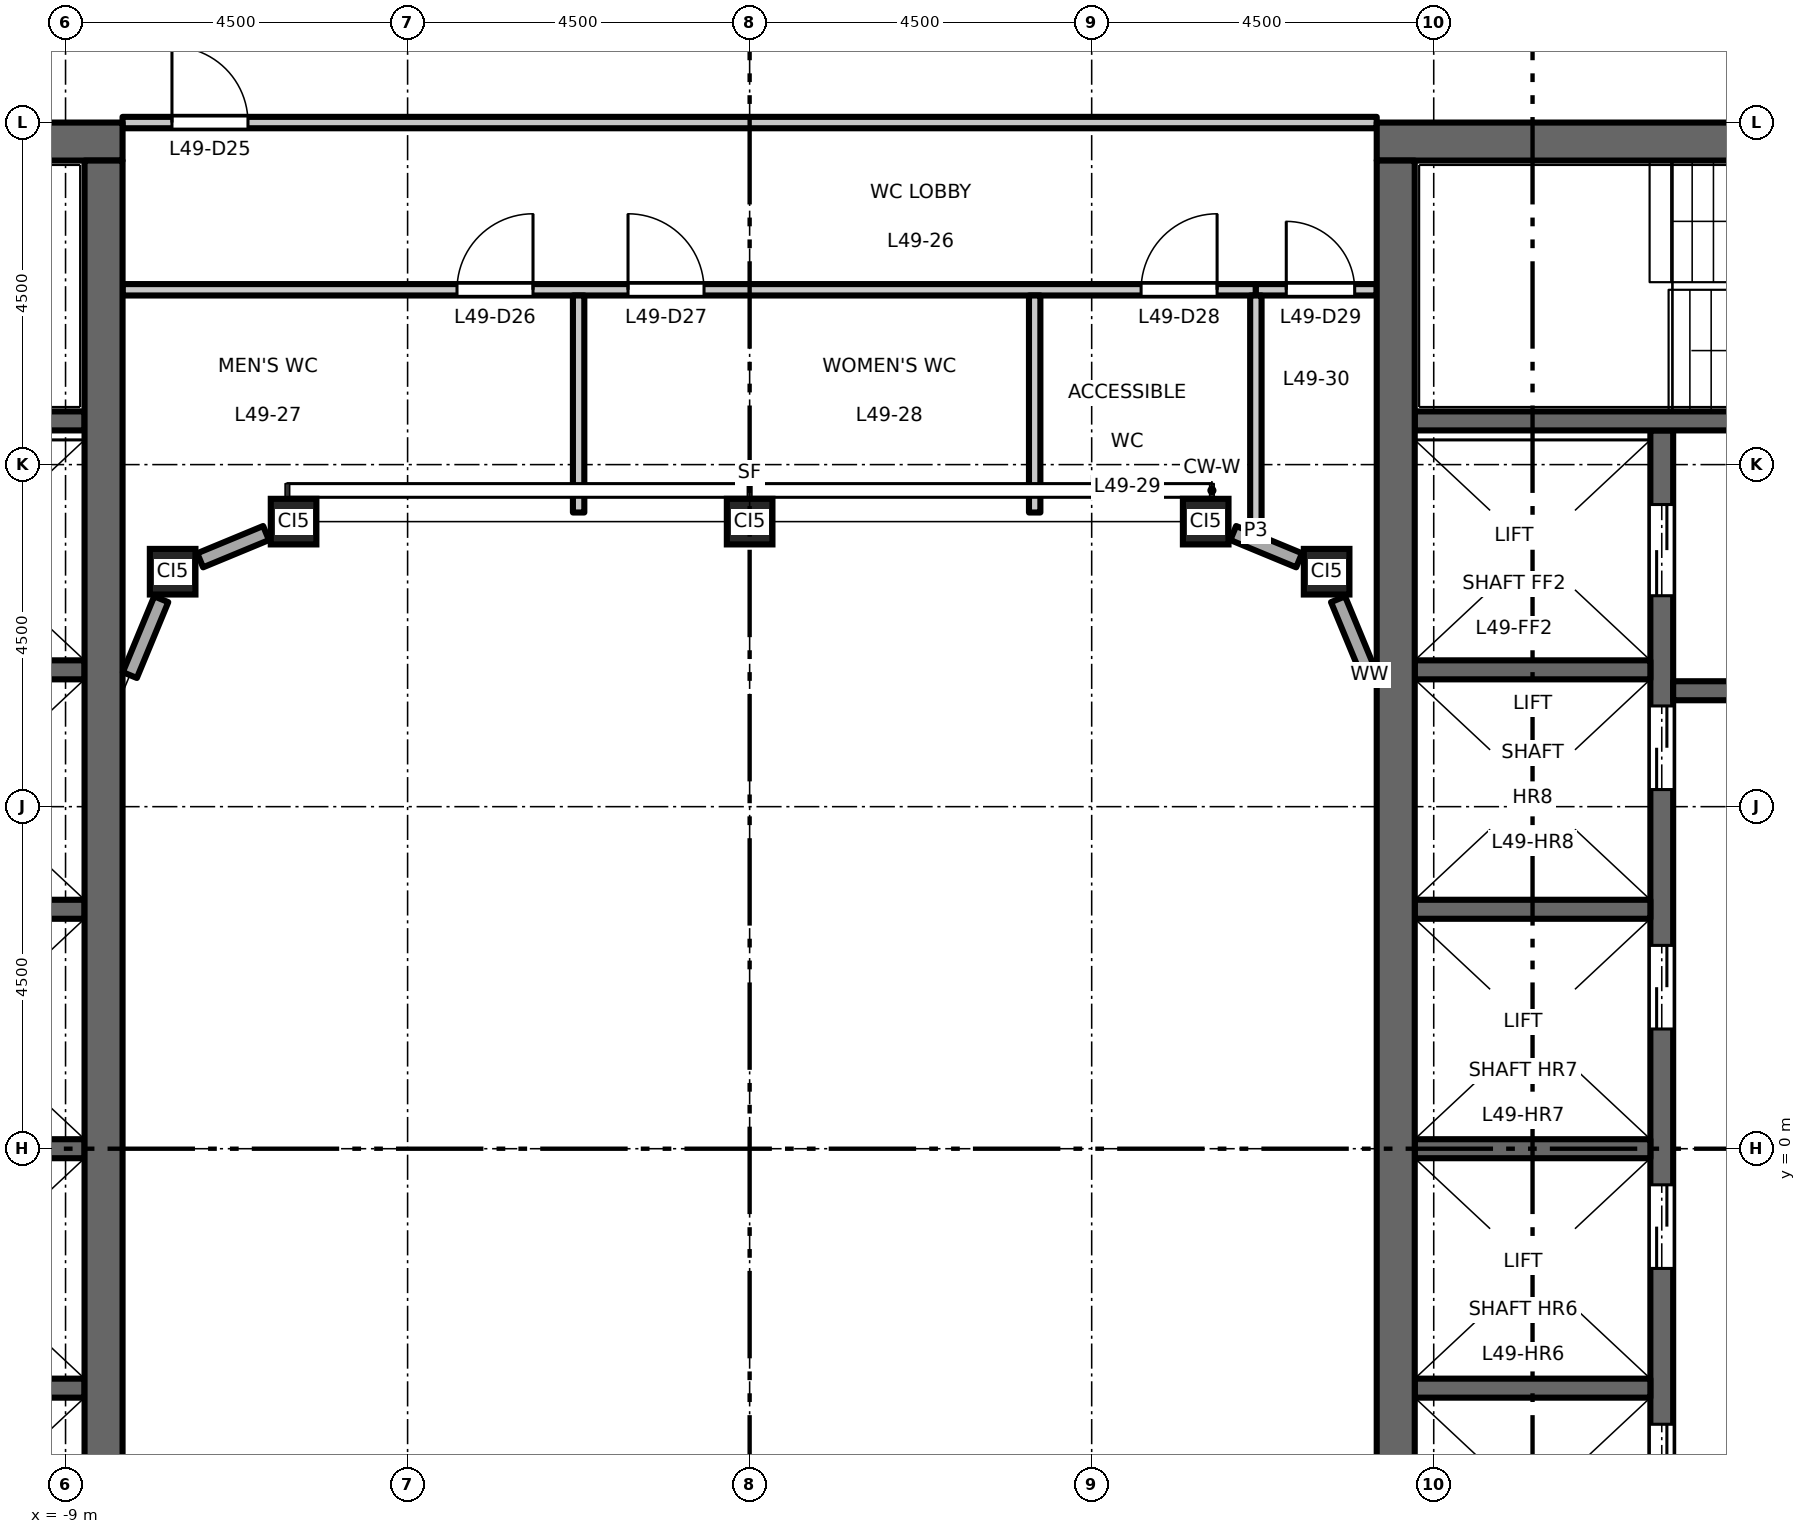
"""IFC4 building model, lengths in metres.
Left out: names, types, materials, properties, quantities, classifications, styles, units other than length and angle.
Written with IfcOpenShell. Run it as: python <this file> out.ifc"""

import sys

from ifc_helpers import new_model, si_unit, direction, frame, frame_2d, origin, origin_2d, place, context, subcontext, project, spatial, rectangle, hollow_rectangle, extrude, element, fill, save


model = new_model("IFC4")
c1 = context("Model", 3, precision=1e-05, world=origin(), true_north=direction((0.0, 1.0)))
c2 = subcontext(c1, "Body", "Model", "MODEL_VIEW")
j1 = project(units=[si_unit("LENGTHUNIT", "METRE"), si_unit("PLANEANGLEUNIT", "RADIAN")], contexts=[c1])
p1 = place(None, origin())
s1 = spatial("IfcSite", under=j1, at=p1, CompositionType="ELEMENT")
p2 = place(p1, origin())
s2 = spatial("IfcBuilding", under=s1, at=p2, CompositionType="ELEMENT")
p3 = place(p2, frame((0.0, 0.0, 228.7)))
s3 = spatial("IfcBuildingStorey", under=s2, at=p3, CompositionType="ELEMENT", Elevation=228.7)
for number, where, z_axis, x_axis in (
    (1, (-7.591, 7.591, 0.0), (0.0, 0.0, 1.0), (1.0, 0.0, 0.0)),
    (2, (-6.0, 8.25, 0.0), (0.0, 0.0, 1.0), (1.0, 0.0, 0.0)),
    (3, (0.0, 8.25, 0.0), (0.0, 0.0, 1.0), (1.0, 0.0, 0.0)),
    (4, (6.0, 8.25, 0.0), (0.0, 0.0, 1.0), (1.0, 0.0, 0.0)),
    (5, (7.591, 7.591, 0.0), (0.0, 0.0, 1.0), (1.0, 0.0, 0.0)),
):
    element("IfcColumn", number, at=place(p3, frame(where, z_axis=z_axis, x_axis=x_axis)), inside=s3, PredefinedType="COLUMN", context=c2, shape_type="SweptSolid", body=[
        extrude(hollow_rectangle(XDim=0.6, YDim=0.6, WallThickness=0.032, at=origin_2d()), origin(), (0.0, 0.0, 1.0), 4.5),
    ])
for number, where, z_axis, x_axis in (
    (6, (-8.75, 0.0, 0.0), (0.0, 0.0, 1.0), (-1.0, 0.0, 0.0)),
    (7, (-8.75, 3.15, 0.0), (0.0, 0.0, 1.0), (-1.0, 0.0, 0.0)),
    (8, (-8.75, 6.3, 0.0), (0.0, 0.0, 1.0), (-1.0, 0.0, 0.0)),
    (9, (-8.75, -3.15, 0.0), (0.0, 0.0, 1.0), (-1.0, 0.0, 0.0)),
):
    element("IfcWall", number, at=place(p3, frame(where, z_axis=z_axis, x_axis=x_axis)), inside=s3, PredefinedType="SHEAR", context=c2, shape_type="SweptSolid", body=[
        extrude(rectangle(XDim=3.1, YDim=0.25, at=frame_2d((1.55, 0.0))), origin(), (0.0, 0.0, 1.0), 4.35),
    ])
p4 = place(p3, frame((-8.75, 9.575, 0.0), z_axis=(0.0, 0.0, 1.0), x_axis=(-1.0, 0.0, 0.0)))
e10 = element("IfcWall", 10, at=p4, inside=s3, PredefinedType="SHEAR", context=c2, shape_type="SweptSolid", body=[
    extrude(rectangle(XDim=8.0, YDim=0.25, at=frame_2d((4.0, 0.0))), origin(), (0.0, 0.0, 1.0), 4.35),
])
p5 = place(p4, frame((6.65, 0.0, 0.0)))
e11 = element("IfcOpeningElement", 11, at=p5, cuts=e10, PredefinedType="OPENING", context=c2, shape_type="SweptSolid", body=[
    extrude(rectangle(XDim=1.1, YDim=2.1, at=frame_2d((0.55, 1.05))), frame((0.0, 0.135, 0.0), z_axis=(0.0, -1.0, 0.0), x_axis=(1.0, 0.0, 0.0)), (0.0, 0.0, 1.0), 0.27),
])
p6 = place(p3, frame((-8.25, 13.25, 0.0), z_axis=(0.0, 0.0, 1.0), x_axis=(-1.0, 0.0, 0.0)))
e12 = element("IfcWall", 12, at=p6, inside=s3, PredefinedType="SHEAR", context=c2, shape_type="SweptSolid", body=[
    extrude(rectangle(XDim=13.5, YDim=0.5, at=frame_2d((6.75, 0.0))), origin(), (0.0, 0.0, 1.0), 4.35),
])
p7 = place(p3, frame((-8.5, -13.0, 0.0), z_axis=(0.0, 0.0, 1.0), x_axis=(0.0, 1.0, 0.0)))
e13 = element("IfcWall", 13, at=p7, inside=s3, PredefinedType="SHEAR", context=c2, shape_type="SweptSolid", body=[
    extrude(rectangle(XDim=26.0, YDim=0.5, at=frame_2d((13.0, 0.0))), origin(), (0.0, 0.0, 1.0), 4.35),
])
p8 = place(p3, frame((12.0, -9.45, 0.0), z_axis=(0.0, 0.0, 1.0), x_axis=(0.0, 1.0, 0.0)))
e14 = element("IfcWall", 14, at=p8, inside=s3, PredefinedType="SHEAR", context=c2, shape_type="SweptSolid", body=[
    extrude(rectangle(XDim=18.9, YDim=0.3, at=frame_2d((9.45, 0.0))), origin(), (0.0, 0.0, 1.0), 4.35),
])
p9 = place(p8, frame((4.725, 0.0, 0.0)))
e15 = element("IfcOpeningElement", 15, at=p9, cuts=e14, PredefinedType="OPENING", context=c2, shape_type="SweptSolid", body=[
    extrude(rectangle(XDim=1.1, YDim=2.1, at=frame_2d((0.55, 1.05))), frame((0.0, 0.16, 0.0), z_axis=(0.0, -1.0, 0.0), x_axis=(1.0, 0.0, 0.0)), (0.0, 0.0, 1.0), 0.32),
])
p10 = place(p8, frame((7.875, 0.0, 0.0)))
e16 = element("IfcOpeningElement", 16, at=p10, cuts=e14, PredefinedType="OPENING", context=c2, shape_type="SweptSolid", body=[
    extrude(rectangle(XDim=1.1, YDim=2.1, at=frame_2d((0.55, 1.05))), frame((0.0, 0.16, 0.0), z_axis=(0.0, -1.0, 0.0), x_axis=(1.0, 0.0, 0.0)), (0.0, 0.0, 1.0), 0.32),
])
p11 = place(p8, frame((11.025, 0.0, 0.0)))
e17 = element("IfcOpeningElement", 17, at=p11, cuts=e14, PredefinedType="OPENING", context=c2, shape_type="SweptSolid", body=[
    extrude(rectangle(XDim=1.1, YDim=2.1, at=frame_2d((0.55, 1.05))), frame((0.0, 0.16, 0.0), z_axis=(0.0, -1.0, 0.0), x_axis=(1.0, 0.0, 0.0)), (0.0, 0.0, 1.0), 0.32),
])
p12 = place(p8, frame((14.175, 0.0, 0.0)))
e18 = element("IfcOpeningElement", 18, at=p12, cuts=e14, PredefinedType="OPENING", context=c2, shape_type="SweptSolid", body=[
    extrude(rectangle(XDim=1.1, YDim=2.1, at=frame_2d((0.55, 1.05))), frame((0.0, 0.16, 0.0), z_axis=(0.0, -1.0, 0.0), x_axis=(1.0, 0.0, 0.0)), (0.0, 0.0, 1.0), 0.32),
])
p13 = place(p8, frame((16.725, 0.0, 0.0)))
e19 = element("IfcOpeningElement", 19, at=p13, cuts=e14, PredefinedType="OPENING", context=c2, shape_type="SweptSolid", body=[
    extrude(rectangle(XDim=1.2, YDim=2.1, at=frame_2d((0.6, 1.05))), frame((0.0, 0.16, 0.0), z_axis=(0.0, -1.0, 0.0), x_axis=(1.0, 0.0, 0.0)), (0.0, 0.0, 1.0), 0.32),
])
p14 = place(p8, frame((0.975, 0.0, 0.0)))
e20 = element("IfcOpeningElement", 20, at=p14, cuts=e14, PredefinedType="OPENING", context=c2, shape_type="SweptSolid", body=[
    extrude(rectangle(XDim=1.2, YDim=2.1, at=frame_2d((0.6, 1.05))), frame((0.0, 0.16, 0.0), z_axis=(0.0, -1.0, 0.0), x_axis=(1.0, 0.0, 0.0)), (0.0, 0.0, 1.0), 0.32),
])
p15 = place(p3, frame((12.15, 6.025, 0.0), z_axis=(0.0, 0.0, 1.0), x_axis=(1.0, 0.0, 0.0)))
e21 = element("IfcWall", 21, at=p15, inside=s3, PredefinedType="SHEAR", context=c2, shape_type="SweptSolid", body=[
    extrude(rectangle(XDim=4.6, YDim=0.25, at=frame_2d((2.3, 0.0))), origin(), (0.0, 0.0, 1.0), 4.35),
])
p16 = place(p15, frame((1.8, 0.0, 0.0)))
e22 = element("IfcOpeningElement", 22, at=p16, cuts=e21, PredefinedType="OPENING", context=c2, shape_type="SweptSolid", body=[
    extrude(rectangle(XDim=1.0, YDim=2.1, at=frame_2d((0.5, 1.05))), frame((0.0, 0.135, 0.0), z_axis=(0.0, -1.0, 0.0), x_axis=(1.0, 0.0, 0.0)), (0.0, 0.0, 1.0), 0.27),
])
for number, where, z_axis, x_axis in (
    (23, (8.75, 0.0, 0.0), (0.0, 0.0, 1.0), (1.0, 0.0, 0.0)),
    (24, (8.75, 3.15, 0.0), (0.0, 0.0, 1.0), (1.0, 0.0, 0.0)),
    (25, (8.75, 6.3, 0.0), (0.0, 0.0, 1.0), (1.0, 0.0, 0.0)),
    (26, (8.75, -3.15, 0.0), (0.0, 0.0, 1.0), (1.0, 0.0, 0.0)),
):
    element("IfcWall", number, at=place(p3, frame(where, z_axis=z_axis, x_axis=x_axis)), inside=s3, PredefinedType="SHEAR", context=c2, shape_type="SweptSolid", body=[
        extrude(rectangle(XDim=3.1, YDim=0.25, at=frame_2d((1.55, 0.0))), origin(), (0.0, 0.0, 1.0), 4.35),
    ])
p17 = place(p3, frame((8.75, 9.575, 0.0), z_axis=(0.0, 0.0, 1.0), x_axis=(1.0, 0.0, 0.0)))
e27 = element("IfcWall", 27, at=p17, inside=s3, PredefinedType="SHEAR", context=c2, shape_type="SweptSolid", body=[
    extrude(rectangle(XDim=8.0, YDim=0.25, at=frame_2d((4.0, 0.0))), origin(), (0.0, 0.0, 1.0), 4.35),
])
p18 = place(p17, frame((6.65, 0.0, 0.0)))
e28 = element("IfcOpeningElement", 28, at=p18, cuts=e27, PredefinedType="OPENING", context=c2, shape_type="SweptSolid", body=[
    extrude(rectangle(XDim=1.1, YDim=2.1, at=frame_2d((0.55, 1.05))), frame((0.0, 0.135, 0.0), z_axis=(0.0, -1.0, 0.0), x_axis=(1.0, 0.0, 0.0)), (0.0, 0.0, 1.0), 0.27),
])
p19 = place(p3, frame((8.25, 13.25, 0.0), z_axis=(0.0, 0.0, 1.0), x_axis=(1.0, 0.0, 0.0)))
e29 = element("IfcWall", 29, at=p19, inside=s3, PredefinedType="SHEAR", context=c2, shape_type="SweptSolid", body=[
    extrude(rectangle(XDim=13.5, YDim=0.5, at=frame_2d((6.75, 0.0))), origin(), (0.0, 0.0, 1.0), 4.35),
])
p20 = place(p3, frame((8.5, -13.0, 0.0), z_axis=(0.0, 0.0, 1.0), x_axis=(0.0, 1.0, 0.0)))
e30 = element("IfcWall", 30, at=p20, inside=s3, PredefinedType="SHEAR", context=c2, shape_type="SweptSolid", body=[
    extrude(rectangle(XDim=26.0, YDim=0.5, at=frame_2d((13.0, 0.0))), origin(), (0.0, 0.0, 1.0), 4.35),
])
p21 = place(p3, frame((8.154, 6.231, 0.0), z_axis=(0.0, 0.0, 1.0), x_axis=(-0.382704496366, 0.923870807235, 0.0)))
e31 = element("IfcWall", 31, at=p21, inside=s3, PredefinedType="STANDARD", context=c2, shape_type="SweptSolid", body=[
    extrude(rectangle(XDim=1.08, YDim=0.2, at=frame_2d((0.54, 0.0))), origin(), (0.0, 0.0, 1.0), 3.918),
])
for number, where, z_axis, x_axis in (
    (32, (7.229, 7.741, 0.0), (0.0, 0.0, 1.0), (-0.924, 0.383, 0.0)),
    (33, (-6.362, 8.1, 0.0), (0.0, 0.0, 1.0), (-0.924, -0.383, 0.0)),
):
    element("IfcWall", number, at=place(p3, frame(where, z_axis=z_axis, x_axis=x_axis)), inside=s3, PredefinedType="STANDARD", context=c2, shape_type="SweptSolid", body=[
        extrude(rectangle(XDim=0.938, YDim=0.2, at=frame_2d((0.469, 0.0))), origin(), (0.0, 0.0, 1.0), 3.918),
    ])
p22 = place(p3, frame((-7.741, 7.229, 0.0), z_axis=(0.0, 0.0, 1.0), x_axis=(-0.382704496366, -0.923870807235, 0.0)))
e34 = element("IfcWall", 34, at=p22, inside=s3, PredefinedType="STANDARD", context=c2, shape_type="SweptSolid", body=[
    extrude(rectangle(XDim=1.08, YDim=0.2, at=frame_2d((0.54, 0.0))), origin(), (0.0, 0.0, 1.0), 3.918),
])
p23 = place(p3, frame((-8.25, 11.3, 0.0), z_axis=(0.0, 0.0, 1.0), x_axis=(1.0, 0.0, 0.0)))
e35 = element("IfcWall", 35, at=p23, inside=s3, PredefinedType="PARTITIONING", context=c2, shape_type="SweptSolid", body=[
    extrude(rectangle(XDim=14.91, YDim=0.15, at=frame_2d((7.455, 0.0))), origin(), (0.0, 0.0, 1.0), 4.35),
])
p24 = place(p23, frame((4.4, 0.0, 0.0)))
e36 = element("IfcOpeningElement", 36, at=p24, cuts=e35, PredefinedType="OPENING", context=c2, shape_type="SweptSolid", body=[
    extrude(rectangle(XDim=1.0, YDim=2.1, at=frame_2d((0.5, 1.05))), frame((0.0, 0.085, 0.0), z_axis=(0.0, -1.0, 0.0), x_axis=(1.0, 0.0, 0.0)), (0.0, 0.0, 1.0), 0.17),
])
p25 = place(p23, frame((6.65, 0.0, 0.0)))
e37 = element("IfcOpeningElement", 37, at=p25, cuts=e35, PredefinedType="OPENING", context=c2, shape_type="SweptSolid", body=[
    extrude(rectangle(XDim=1.0, YDim=2.1, at=frame_2d((0.5, 1.05))), frame((0.0, 0.085, 0.0), z_axis=(0.0, -1.0, 0.0), x_axis=(1.0, 0.0, 0.0)), (0.0, 0.0, 1.0), 0.17),
])
p26 = place(p23, frame((13.4, 0.0, 0.0)))
e38 = element("IfcOpeningElement", 38, at=p26, cuts=e35, PredefinedType="OPENING", context=c2, shape_type="SweptSolid", body=[
    extrude(rectangle(XDim=1.0, YDim=2.1, at=frame_2d((0.5, 1.05))), frame((0.0, 0.085, 0.0), z_axis=(0.0, -1.0, 0.0), x_axis=(1.0, 0.0, 0.0)), (0.0, 0.0, 1.0), 0.17),
])
p27 = place(p3, frame((6.66, 11.3, 0.0), z_axis=(0.0, 0.0, 1.0), x_axis=(1.0, 0.0, 0.0)))
e39 = element("IfcWall", 39, at=p27, inside=s3, PredefinedType="PARTITIONING", context=c2, shape_type="SweptSolid", body=[
    extrude(rectangle(XDim=1.59, YDim=0.15, at=frame_2d((0.795, 0.0))), origin(), (0.0, 0.0, 1.0), 4.35),
])
p28 = place(p27, frame((0.4, 0.0, 0.0)))
e40 = element("IfcOpeningElement", 40, at=p28, cuts=e39, PredefinedType="OPENING", context=c2, shape_type="SweptSolid", body=[
    extrude(rectangle(XDim=0.9, YDim=2.1, at=frame_2d((0.45, 1.05))), frame((0.0, 0.085, 0.0), z_axis=(0.0, -1.0, 0.0), x_axis=(1.0, 0.0, 0.0)), (0.0, 0.0, 1.0), 0.17),
])
p29 = place(p3, frame((-8.25, 13.5, 0.0), z_axis=(0.0, 0.0, 1.0), x_axis=(1.0, 0.0, 0.0)))
e41 = element("IfcWall", 41, at=p29, inside=s3, PredefinedType="PARTITIONING", context=c2, shape_type="SweptSolid", body=[
    extrude(rectangle(XDim=16.5, YDim=0.15, at=frame_2d((8.25, 0.0))), origin(), (0.0, 0.0, 1.0), 4.35),
])
p30 = place(p29, frame((0.65, 0.0, 0.0)))
e42 = element("IfcOpeningElement", 42, at=p30, cuts=e41, PredefinedType="OPENING", context=c2, shape_type="SweptSolid", body=[
    extrude(rectangle(XDim=1.0, YDim=2.1, at=frame_2d((0.5, 1.05))), frame((0.0, 0.085, 0.0), z_axis=(0.0, -1.0, 0.0), x_axis=(1.0, 0.0, 0.0)), (0.0, 0.0, 1.0), 0.17),
])
for number, where, z_axis, x_axis in (
    (43, (-2.25, 8.37, 0.0), (0.0, 0.0, 1.0), (0.0, 1.0, 0.0)),
    (44, (3.75, 8.37, 0.0), (0.0, 0.0, 1.0), (0.0, 1.0, 0.0)),
):
    element("IfcWall", number, at=place(p3, frame(where, z_axis=z_axis, x_axis=x_axis)), inside=s3, PredefinedType="PARTITIONING", context=c2, shape_type="SweptSolid", body=[
        extrude(rectangle(XDim=2.855, YDim=0.15, at=frame_2d((1.427, 0.0))), origin(), (0.0, 0.0, 1.0), 4.35),
    ])
p31 = place(p3, frame((6.66, 8.127, 0.0), z_axis=(0.0, 0.0, 1.0), x_axis=(0.0, 1.0, 0.0)))
e45 = element("IfcWall", 45, at=p31, inside=s3, PredefinedType="PARTITIONING", context=c2, shape_type="SweptSolid", body=[
    extrude(rectangle(XDim=3.098, YDim=0.15, at=frame_2d((1.549, 0.0))), origin(), (0.0, 0.0, 1.0), 4.35),
])
p32 = place(p9, origin())
e46 = element("IfcDoor", 46, at=p32, inside=s3, OperationType="DOUBLE_DOOR_SLIDING", PredefinedType="DOOR", context=c2, shape_type="SweptSolid", body=[
    extrude(rectangle(XDim=1.1, YDim=2.1, at=frame_2d((0.55, 1.05))), frame((0.0, 0.025, 0.0), z_axis=(0.0, -1.0, 0.0), x_axis=(1.0, 0.0, 0.0)), (0.0, 0.0, 1.0), 0.05),
])
fill(e15, e46)
p33 = place(p10, origin())
e47 = element("IfcDoor", 47, at=p33, inside=s3, OperationType="DOUBLE_DOOR_SLIDING", PredefinedType="DOOR", context=c2, shape_type="SweptSolid", body=[
    extrude(rectangle(XDim=1.1, YDim=2.1, at=frame_2d((0.55, 1.05))), frame((0.0, 0.025, 0.0), z_axis=(0.0, -1.0, 0.0), x_axis=(1.0, 0.0, 0.0)), (0.0, 0.0, 1.0), 0.05),
])
fill(e16, e47)
p34 = place(p11, origin())
e48 = element("IfcDoor", 48, at=p34, inside=s3, OperationType="DOUBLE_DOOR_SLIDING", PredefinedType="DOOR", context=c2, shape_type="SweptSolid", body=[
    extrude(rectangle(XDim=1.1, YDim=2.1, at=frame_2d((0.55, 1.05))), frame((0.0, 0.025, 0.0), z_axis=(0.0, -1.0, 0.0), x_axis=(1.0, 0.0, 0.0)), (0.0, 0.0, 1.0), 0.05),
])
fill(e17, e48)
p35 = place(p12, origin())
e49 = element("IfcDoor", 49, at=p35, inside=s3, OperationType="DOUBLE_DOOR_SLIDING", PredefinedType="DOOR", context=c2, shape_type="SweptSolid", body=[
    extrude(rectangle(XDim=1.1, YDim=2.1, at=frame_2d((0.55, 1.05))), frame((0.0, 0.025, 0.0), z_axis=(0.0, -1.0, 0.0), x_axis=(1.0, 0.0, 0.0)), (0.0, 0.0, 1.0), 0.05),
])
fill(e18, e49)
p36 = place(p13, origin())
e50 = element("IfcDoor", 50, at=p36, inside=s3, OperationType="DOUBLE_DOOR_SLIDING", PredefinedType="DOOR", context=c2, shape_type="SweptSolid", body=[
    extrude(rectangle(XDim=1.2, YDim=2.1, at=frame_2d((0.6, 1.05))), frame((0.0, 0.025, 0.0), z_axis=(0.0, -1.0, 0.0), x_axis=(1.0, 0.0, 0.0)), (0.0, 0.0, 1.0), 0.05),
])
fill(e19, e50)
p37 = place(p30, origin())
e51 = element("IfcDoor", 51, at=p37, inside=s3, OperationType="SINGLE_SWING_LEFT", PredefinedType="DOOR", context=c2, shape_type="SweptSolid", body=[
    extrude(rectangle(XDim=1.0, YDim=2.1, at=frame_2d((0.5, 1.05))), frame((0.0, 0.025, 0.0), z_axis=(0.0, -1.0, 0.0), x_axis=(1.0, 0.0, 0.0)), (0.0, 0.0, 1.0), 0.05),
])
fill(e42, e51)
p38 = place(p24, origin())
e52 = element("IfcDoor", 52, at=p38, inside=s3, OperationType="SINGLE_SWING_RIGHT", PredefinedType="DOOR", context=c2, shape_type="SweptSolid", body=[
    extrude(rectangle(XDim=1.0, YDim=2.1, at=frame_2d((0.5, 1.05))), frame((0.0, 0.025, 0.0), z_axis=(0.0, -1.0, 0.0), x_axis=(1.0, 0.0, 0.0)), (0.0, 0.0, 1.0), 0.05),
])
fill(e36, e52)
p39 = place(p25, origin())
e53 = element("IfcDoor", 53, at=p39, inside=s3, OperationType="SINGLE_SWING_LEFT", PredefinedType="DOOR", context=c2, shape_type="SweptSolid", body=[
    extrude(rectangle(XDim=1.0, YDim=2.1, at=frame_2d((0.5, 1.05))), frame((0.0, 0.025, 0.0), z_axis=(0.0, -1.0, 0.0), x_axis=(1.0, 0.0, 0.0)), (0.0, 0.0, 1.0), 0.05),
])
fill(e37, e53)
p40 = place(p26, origin())
e54 = element("IfcDoor", 54, at=p40, inside=s3, OperationType="SINGLE_SWING_RIGHT", PredefinedType="DOOR", context=c2, shape_type="SweptSolid", body=[
    extrude(rectangle(XDim=1.0, YDim=2.1, at=frame_2d((0.5, 1.05))), frame((0.0, 0.025, 0.0), z_axis=(0.0, -1.0, 0.0), x_axis=(1.0, 0.0, 0.0)), (0.0, 0.0, 1.0), 0.05),
])
fill(e38, e54)
p41 = place(p28, origin())
e55 = element("IfcDoor", 55, at=p41, inside=s3, OperationType="SINGLE_SWING_LEFT", PredefinedType="DOOR", context=c2, shape_type="SweptSolid", body=[
    extrude(rectangle(XDim=0.9, YDim=2.1, at=frame_2d((0.45, 1.05))), frame((0.0, 0.025, 0.0), z_axis=(0.0, -1.0, 0.0), x_axis=(1.0, 0.0, 0.0)), (0.0, 0.0, 1.0), 0.05),
])
fill(e40, e55)
save(model, sys.argv[1])
